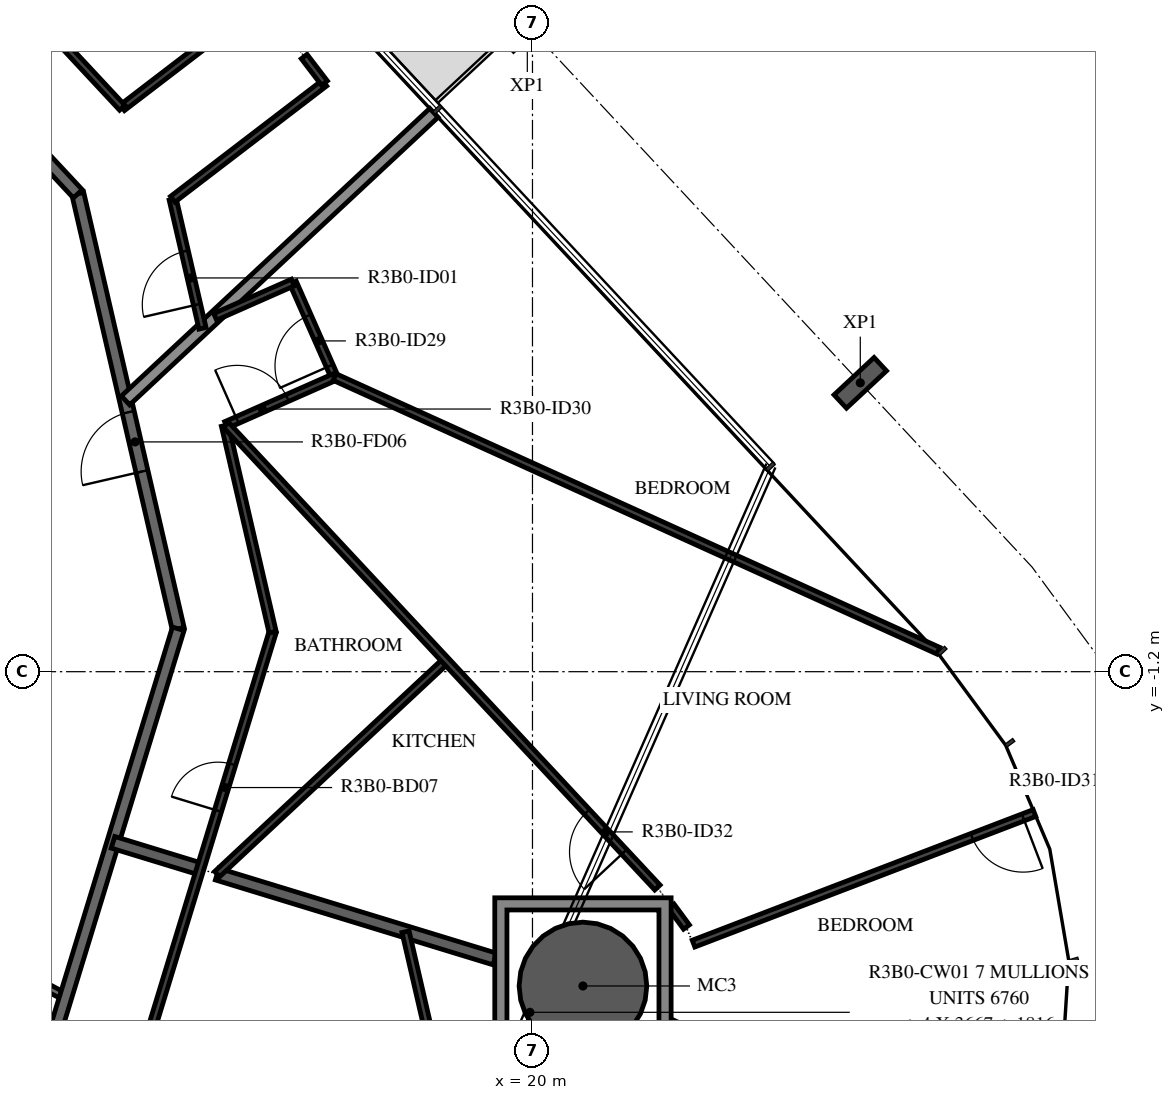
"""IFC4 building model, lengths in metres.
Left out: names, types, materials, properties, quantities, classifications, styles, units other than length and angle.
Written with IfcOpenShell. Run it as: python <this file> out.ifc"""

import sys

from ifc_helpers import new_model, si_unit, direction, frame, frame_2d, origin, origin_2d, place, context, subcontext, project, spatial, polyline, rectangle, hollow_circle, i_section, outline, extrude, element, fill, save


model = new_model("IFC4")
c1 = context("Model", 3, precision=1e-05, world=origin(), true_north=direction((0.0, 1.0)))
c2 = subcontext(c1, "Body", "Model", "MODEL_VIEW")
j1 = project(units=[si_unit("LENGTHUNIT", "METRE"), si_unit("PLANEANGLEUNIT", "RADIAN")], contexts=[c1])
p1 = place(None, origin())
s1 = spatial("IfcSite", under=j1, at=p1, CompositionType="ELEMENT")
p2 = place(p1, origin())
s2 = spatial("IfcBuilding", under=s1, at=p2, CompositionType="ELEMENT")
p3 = place(p2, frame((0.0, 0.0, 127.4)))
s3 = spatial("IfcBuildingStorey", under=s2, at=p3, CompositionType="ELEMENT", Elevation=127.4)
p4 = place(p3, frame((20.83, -6.368, -0.38), z_axis=(0.0, 0.0, 1.0), x_axis=(1.0, 0.0, 0.0)))
e1 = element("IfcColumn", 1, at=p4, inside=s3, PredefinedType="COLUMN", context=c2, shape_type="SweptSolid", body=[
    extrude(hollow_circle(Radius=1.05, WallThickness=0.05, at=origin_2d()), origin(), (0.0, 0.0, 1.0), 3.5),
])
p5 = place(p3, frame((25.391, 3.55, -0.38), z_axis=(0.0, 0.0, 1.0), x_axis=(0.68199801865, -0.731354019992, 0.0)))
e2 = element("IfcColumn", 2, at=p5, inside=s3, PredefinedType="COLUMN", context=c2, shape_type="SweptSolid", body=[
    extrude(i_section(OverallWidth=0.3, OverallDepth=0.9, WebThickness=0.019, FlangeThickness=0.035, FilletRadius=0.03, at=origin_2d()), origin(), (0.0, 0.0, 1.0), 3.5),
])
p6 = place(p3, frame((10.511, -5.589, 0.0), z_axis=(0.0, 0.0, 1.0), x_axis=(0.882987820808, -0.469395897196, 0.0)))
e3 = element("IfcWall", 3, at=p6, inside=s3, PredefinedType="PARTITIONING", context=c2, shape_type="SweptSolid", body=[
    extrude(rectangle(XDim=2.052, YDim=0.12, at=frame_2d((1.026, 0.0))), origin(), (0.0, 0.0, 1.0), 3.12),
])
p7 = place(p6, frame((0.1, 0.0, 0.0)))
e4 = element("IfcOpeningElement", 4, at=p7, cuts=e3, PredefinedType="OPENING", context=c2, shape_type="SweptSolid", body=[
    extrude(rectangle(XDim=1.2, YDim=2.1, at=frame_2d((0.6, 1.05))), frame((0.0, 0.07, 0.0), z_axis=(0.0, -1.0, 0.0), x_axis=(1.0, 0.0, 0.0)), (0.0, 0.0, 1.0), 0.14),
])
p8 = place(p3, frame((14.175, -0.495, 0.0), z_axis=(0.0, 0.0, 1.0), x_axis=(-0.224922649383, 0.974376622151, 0.0)))
e5 = element("IfcWall", 5, at=p8, inside=s3, PredefinedType="STANDARD", context=c2, shape_type="SweptSolid", body=[
    extrude(rectangle(XDim=7.342, YDim=0.2, at=frame_2d((3.671, 0.0))), origin(), (0.0, 0.0, 1.0), 3.12),
])
p9 = place(p8, frame((2.655, 0.0, 0.0)))
e6 = element("IfcOpeningElement", 6, at=p9, cuts=e5, PredefinedType="OPENING", context=c2, shape_type="SweptSolid", body=[
    extrude(rectangle(XDim=1.0, YDim=2.1, at=frame_2d((0.5, 1.05))), frame((0.0, 0.11, 0.0), z_axis=(0.0, -1.0, 0.0), x_axis=(1.0, 0.0, 0.0)), (0.0, 0.0, 1.0), 0.22),
])
p10 = place(p3, frame((12.523, 6.659, 0.0), z_axis=(0.0, 0.0, 1.0), x_axis=(-0.682001841105, 0.731350455479, 0.0)))
e7 = element("IfcWall", 7, at=p10, inside=s3, PredefinedType="STANDARD", context=c2, shape_type="SweptSolid", body=[
    extrude(rectangle(XDim=7.342, YDim=0.2, at=frame_2d((3.671, 0.0))), origin(), (0.0, 0.0, 1.0), 3.12),
])
p11 = place(p10, frame((3.2, 0.0, 0.0)))
e8 = element("IfcOpeningElement", 8, at=p11, cuts=e7, PredefinedType="OPENING", context=c2, shape_type="SweptSolid", body=[
    extrude(rectangle(XDim=1.0, YDim=2.1, at=frame_2d((0.5, 1.05))), frame((0.0, 0.11, 0.0), z_axis=(0.0, -1.0, 0.0), x_axis=(1.0, 0.0, 0.0)), (0.0, 0.0, 1.0), 0.22),
])
p12 = place(p3, frame((12.028, -7.516, 0.0), z_axis=(0.0, 0.0, 1.0), x_axis=(0.292365533182, 0.956306642771, 0.0)))
e9 = element("IfcWall", 9, at=p12, inside=s3, PredefinedType="STANDARD", context=c2, shape_type="SweptSolid", body=[
    extrude(rectangle(XDim=7.342, YDim=0.2, at=frame_2d((3.671, 0.0))), origin(), (0.0, 0.0, 1.0), 3.12),
])
p13 = place(p3, frame((13.308, 3.261, 0.0), z_axis=(0.0, 0.0, 1.0), x_axis=(0.731356087831, 0.681995801154, 0.0)))
e10 = element("IfcWall", 10, at=p13, inside=s3, PredefinedType="STANDARD", context=c2, shape_type="SweptSolid", body=[
    extrude(rectangle(XDim=6.934, YDim=0.2, at=frame_2d((3.467, 0.0))), origin(), (0.0, 0.0, 1.0), 2.73),
])
p14 = place(p3, frame((14.536, -4.444, 0.0), z_axis=(0.0, 0.0, 1.0), x_axis=(-0.956326299111, 0.292301230974, 0.0)))
e11 = element("IfcWall", 11, at=p14, inside=s3, PredefinedType="STANDARD", context=c2, shape_type="SweptSolid", body=[
    extrude(rectangle(XDim=1.5, YDim=0.2, at=frame_2d((0.75, 0.0))), origin(), (0.0, 0.0, 1.0), 3.12),
])
p15 = place(p3, frame((19.38, -5.925, 0.0), z_axis=(0.0, 0.0, 1.0), x_axis=(-0.956301542054, 0.29238221674, 0.0)))
e12 = element("IfcWall", 12, at=p15, inside=s3, PredefinedType="STANDARD", context=c2, shape_type="SweptSolid", body=[
    extrude(rectangle(XDim=4.775, YDim=0.2, at=frame_2d((2.387, 0.0))), origin(), (0.0, 0.0, 1.0), 3.12),
])
p16 = place(p3, frame((14.573, 4.447, 0.0), z_axis=(0.0, 0.0, 1.0), x_axis=(-0.225006886074, 0.97435717333, 0.0)))
e13 = element("IfcWall", 13, at=p16, inside=s3, PredefinedType="PARTITIONING", context=c2, shape_type="SweptSolid", body=[
    extrude(rectangle(XDim=2.178, YDim=0.12, at=frame_2d((1.089, 0.0))), origin(), (0.0, 0.0, 1.0), 3.12),
])
p17 = place(p16, frame((0.4, 0.0, 0.0)))
e14 = element("IfcOpeningElement", 14, at=p17, cuts=e13, PredefinedType="OPENING", context=c2, shape_type="SweptSolid", body=[
    extrude(rectangle(XDim=0.9, YDim=2.1, at=frame_2d((0.45, 1.05))), frame((0.0, 0.07, 0.0), z_axis=(0.0, -1.0, 0.0), x_axis=(1.0, 0.0, 0.0)), (0.0, 0.0, 1.0), 0.14),
])
p18 = place(p3, frame((14.083, 6.569, 0.0), z_axis=(0.0, 0.0, 1.0), x_axis=(0.794099847012, 0.607787325449, 0.0)))
e15 = element("IfcWall", 15, at=p18, inside=s3, PredefinedType="PARTITIONING", context=c2, shape_type="SweptSolid", body=[
    extrude(rectangle(XDim=3.144, YDim=0.12, at=frame_2d((1.572, 0.0))), origin(), (0.0, 0.0, 1.0), 3.12),
])
p19 = place(p3, frame((16.58, 8.479, 0.0), z_axis=(0.0, 0.0, 1.0), x_axis=(-0.607993560766, 0.793941956359, 0.0)))
e16 = element("IfcWall", 16, at=p19, inside=s3, PredefinedType="PARTITIONING", context=c2, shape_type="SweptSolid", body=[
    extrude(rectangle(XDim=0.55, YDim=0.12, at=frame_2d((0.275, 0.0))), origin(), (0.0, 0.0, 1.0), 3.12),
])
p20 = place(p3, frame((15.268, 9.617, 0.0), z_axis=(0.0, 0.0, 1.0), x_axis=(-0.79409554088, -0.607792951551, 0.0)))
e17 = element("IfcWall", 17, at=p20, inside=s3, PredefinedType="PARTITIONING", context=c2, shape_type="SweptSolid", body=[
    extrude(rectangle(XDim=2.537, YDim=0.12, at=frame_2d((1.269, 0.0))), origin(), (0.0, 0.0, 1.0), 3.12),
])
p21 = place(p3, frame((13.254, 8.075, 0.0), z_axis=(0.0, 0.0, 1.0), x_axis=(-0.681995901471, 0.731355994285, 0.0)))
e18 = element("IfcWall", 18, at=p21, inside=s3, PredefinedType="PARTITIONING", context=c2, shape_type="SweptSolid", body=[
    extrude(rectangle(XDim=7.207, YDim=0.12, at=frame_2d((3.603, 0.0))), origin(), (0.0, 0.0, 1.0), 3.12),
])
p22 = place(p21, frame((4.672, 0.0, 0.0)))
e19 = element("IfcOpeningElement", 19, at=p22, cuts=e18, PredefinedType="OPENING", context=c2, shape_type="SweptSolid", body=[
    extrude(rectangle(XDim=0.9, YDim=2.1, at=frame_2d((0.45, 1.05))), frame((0.0, 0.07, 0.0), z_axis=(0.0, -1.0, 0.0), x_axis=(1.0, 0.0, 0.0)), (0.0, 0.0, 1.0), 0.14),
])
p23 = place(p3, frame((13.7, -7.177, 0.0), z_axis=(0.0, 0.0, 1.0), x_axis=(0.292382309758, 0.956301513614, 0.0)))
e20 = element("IfcWall", 20, at=p23, inside=s3, PredefinedType="PARTITIONING", context=c2, shape_type="SweptSolid", body=[
    extrude(rectangle(XDim=6.93, YDim=0.12, at=frame_2d((3.465, 0.0))), origin(), (0.0, 0.0, 1.0), 3.12),
])
p24 = place(p23, frame((3.858, 0.0, 0.0)))
e21 = element("IfcOpeningElement", 21, at=p24, cuts=e20, PredefinedType="OPENING", context=c2, shape_type="SweptSolid", body=[
    extrude(rectangle(XDim=0.8, YDim=2.1, at=frame_2d((0.4, 1.05))), frame((0.0, 0.07, 0.0), z_axis=(0.0, -1.0, 0.0), x_axis=(1.0, 0.0, 0.0)), (0.0, 0.0, 1.0), 0.14),
])
p25 = place(p3, frame((19.245, -11.25, 0.0), z_axis=(0.0, 0.0, 1.0), x_axis=(-0.224958805164, 0.974368275335, 0.0)))
e22 = element("IfcWall", 22, at=p25, inside=s3, PredefinedType="PARTITIONING", context=c2, shape_type="SweptSolid", body=[
    extrude(rectangle(XDim=5.926, YDim=0.12, at=frame_2d((2.963, 0.0))), origin(), (0.0, 0.0, 1.0), 3.12),
])
p26 = place(p25, frame((0.2, 0.0, 0.0)))
e23 = element("IfcOpeningElement", 23, at=p26, cuts=e22, PredefinedType="OPENING", context=c2, shape_type="SweptSolid", body=[
    extrude(rectangle(XDim=0.9, YDim=2.1, at=frame_2d((0.45, 1.05))), frame((0.0, 0.07, 0.0), z_axis=(0.0, -1.0, 0.0), x_axis=(1.0, 0.0, 0.0)), (0.0, 0.0, 1.0), 0.14),
])
p27 = place(p3, frame((16.747, 3.645, 0.0), z_axis=(0.0, 0.0, 1.0), x_axis=(-0.40401852801, 0.914750801598, 0.0)))
e24 = element("IfcWall", 24, at=p27, inside=s3, PredefinedType="PARTITIONING", context=c2, shape_type="SweptSolid", body=[
    extrude(rectangle(XDim=1.7, YDim=0.12, at=frame_2d((0.85, 0.0))), origin(), (0.0, 0.0, 1.0), 3.12),
])
p28 = place(p27, frame((0.2, 0.0, 0.0)))
e25 = element("IfcOpeningElement", 25, at=p28, cuts=e24, PredefinedType="OPENING", context=c2, shape_type="SweptSolid", body=[
    extrude(rectangle(XDim=0.9, YDim=2.1, at=frame_2d((0.45, 1.05))), frame((0.0, 0.07, 0.0), z_axis=(0.0, -1.0, 0.0), x_axis=(1.0, 0.0, 0.0)), (0.0, 0.0, 1.0), 0.14),
])
p29 = place(p3, frame((16.06, 5.2, 0.0), z_axis=(0.0, 0.0, 1.0), x_axis=(-0.91479626238, -0.403915583179, 0.0)))
e26 = element("IfcWall", 26, at=p29, inside=s3, PredefinedType="PARTITIONING", context=c2, shape_type="SweptSolid", body=[
    extrude(rectangle(XDim=1.397, YDim=0.12, at=frame_2d((0.698, 0.0))), origin(), (0.0, 0.0, 1.0), 3.12),
])
p30 = place(p3, frame((15.727, -0.549, 0.0), z_axis=(0.0, 0.0, 1.0), x_axis=(-0.224900416367, 0.974381754097, 0.0)))
e27 = element("IfcWall", 27, at=p30, inside=s3, PredefinedType="PARTITIONING", context=c2, shape_type="SweptSolid", body=[
    extrude(rectangle(XDim=3.487, YDim=0.12, at=frame_2d((1.743, 0.0))), origin(), (0.0, 0.0, 1.0), 3.12),
])
p31 = place(p3, frame((14.962, 2.857, 0.0), z_axis=(0.0, 0.0, 1.0), x_axis=(0.914732858216, 0.404059151734, 0.0)))
e28 = element("IfcWall", 28, at=p31, inside=s3, PredefinedType="PARTITIONING", context=c2, shape_type="SweptSolid", body=[
    extrude(rectangle(XDim=1.951, YDim=0.12, at=frame_2d((0.976, 0.0))), origin(), (0.0, 0.0, 1.0), 3.12),
])
p32 = place(p31, frame((0.2, 0.0, 0.0)))
e29 = element("IfcOpeningElement", 29, at=p32, cuts=e28, PredefinedType="OPENING", context=c2, shape_type="SweptSolid", body=[
    extrude(rectangle(XDim=0.9, YDim=2.1, at=frame_2d((0.45, 1.05))), frame((0.0, 0.07, 0.0), z_axis=(0.0, -1.0, 0.0), x_axis=(1.0, 0.0, 0.0)), (0.0, 0.0, 1.0), 0.14),
])
p33 = place(p3, frame((16.747, 3.645, 0.0), z_axis=(0.0, 0.0, 1.0), x_axis=(0.910796273175, -0.412856087238, 0.0)))
e30 = element("IfcWall", 30, at=p33, inside=s3, PredefinedType="PARTITIONING", context=c2, shape_type="SweptSolid", body=[
    extrude(rectangle(XDim=10.901, YDim=0.12, at=frame_2d((5.45, 0.0))), origin(), (0.0, 0.0, 1.0), 3.12),
])
p34 = place(p3, frame((28.255, -3.525, 0.0), z_axis=(0.0, 0.0, 1.0), x_axis=(-0.933839412031, -0.357692539114, 0.0)))
e31 = element("IfcWall", 31, at=p34, inside=s3, PredefinedType="PARTITIONING", context=c2, shape_type="SweptSolid", body=[
    extrude(rectangle(XDim=6.004, YDim=0.12, at=frame_2d((3.002, 0.0))), origin(), (0.0, 0.0, 1.0), 2.73),
])
p35 = place(p34, frame((0.2, 0.0, 0.0)))
e32 = element("IfcOpeningElement", 32, at=p35, cuts=e31, PredefinedType="OPENING", context=c2, shape_type="SweptSolid", body=[
    extrude(rectangle(XDim=0.9, YDim=2.1, at=frame_2d((0.45, 1.05))), frame((0.0, 0.07, 0.0), z_axis=(0.0, -1.0, 0.0), x_axis=(1.0, 0.0, 0.0)), (0.0, 0.0, 1.0), 0.14),
])
p36 = place(p3, frame((22.532, -5.399, 0.0), z_axis=(0.0, 0.0, 1.0), x_axis=(-0.592456078431, 0.805602752683, 0.0)))
e33 = element("IfcWall", 33, at=p36, inside=s3, PredefinedType="PARTITIONING", context=c2, shape_type="SweptSolid", body=[
    extrude(rectangle(XDim=0.426, YDim=0.12, at=frame_2d((0.213, 0.0))), origin(), (0.0, 0.0, 1.0), 3.12),
])
p37 = place(p3, frame((18.577, -1.02, 0.0), z_axis=(0.0, 0.0, 1.0), x_axis=(-0.731348673524, -0.682003751994, 0.0)))
e34 = element("IfcWall", 34, at=p37, inside=s3, PredefinedType="PARTITIONING", context=c2, shape_type="SweptSolid", body=[
    extrude(rectangle(XDim=5.146, YDim=0.12, at=frame_2d((2.573, 0.0))), origin(), (0.0, 0.0, 1.0), 3.12),
])
p38 = place(p3, frame((22.054, -4.749, 0.0), z_axis=(0.0, 0.0, 1.0), x_axis=(-0.682014558945, 0.731338595582, 0.0)))
e35 = element("IfcWall", 35, at=p38, inside=s3, PredefinedType="PARTITIONING", context=c2, shape_type="SweptSolid", body=[
    extrude(rectangle(XDim=10.399, YDim=0.12, at=frame_2d((5.2, 0.0))), origin(), (0.0, 0.0, 1.0), 3.12),
])
p39 = place(p38, frame((0.8, 0.0, 0.0)))
e36 = element("IfcOpeningElement", 36, at=p39, cuts=e35, PredefinedType="OPENING", context=c2, shape_type="SweptSolid", body=[
    extrude(rectangle(XDim=0.9, YDim=2.1, at=frame_2d((0.45, 1.05))), frame((0.0, 0.07, 0.0), z_axis=(0.0, -1.0, 0.0), x_axis=(1.0, 0.0, 0.0)), (0.0, 0.0, 1.0), 0.14),
])
p40 = place(p3, origin())
e37 = element("IfcWall", 37, at=p40, inside=s3, PredefinedType="STANDARD", context=c2, shape_type="SweptSolid", body=[
    extrude(outline(polyline([(22.28, -4.918), (22.28, -7.818), (19.38, -7.818), (19.38, -4.918), (22.28, -4.918)]), holes=[polyline([(19.58, -7.618), (22.08, -7.618), (22.08, -5.118), (19.58, -5.118), (19.58, -7.618)])]), origin(), (0.0, 0.0, 1.0), 3.12),
])
p41 = place(p17, origin())
e38 = element("IfcDoor", 38, at=p41, inside=s3, OperationType="SINGLE_SWING_LEFT", PredefinedType="DOOR", context=c2, shape_type="SweptSolid", body=[
    extrude(rectangle(XDim=0.9, YDim=2.1, at=frame_2d((0.45, 1.05))), frame((0.0, 0.025, 0.0), z_axis=(0.0, -1.0, 0.0), x_axis=(1.0, 0.0, 0.0)), (0.0, 0.0, 1.0), 0.05),
])
fill(e14, e38)
p42 = place(p9, origin())
e39 = element("IfcDoor", 39, at=p42, inside=s3, OperationType="SINGLE_SWING_LEFT", PredefinedType="DOOR", context=c2, shape_type="SweptSolid", body=[
    extrude(rectangle(XDim=1.0, YDim=2.1, at=frame_2d((0.5, 1.05))), frame((0.0, 0.025, 0.0), z_axis=(0.0, -1.0, 0.0), x_axis=(1.0, 0.0, 0.0)), (0.0, 0.0, 1.0), 0.05),
])
fill(e6, e39)
p43 = place(p28, origin())
e40 = element("IfcDoor", 40, at=p43, inside=s3, OperationType="SINGLE_SWING_LEFT", PredefinedType="DOOR", context=c2, shape_type="SweptSolid", body=[
    extrude(rectangle(XDim=0.9, YDim=2.1, at=frame_2d((0.45, 1.05))), frame((0.0, 0.025, 0.0), z_axis=(0.0, -1.0, 0.0), x_axis=(1.0, 0.0, 0.0)), (0.0, 0.0, 1.0), 0.05),
])
fill(e25, e40)
p44 = place(p24, origin())
e41 = element("IfcDoor", 41, at=p44, inside=s3, OperationType="SINGLE_SWING_LEFT", PredefinedType="DOOR", context=c2, shape_type="SweptSolid", body=[
    extrude(rectangle(XDim=0.8, YDim=2.1, at=frame_2d((0.4, 1.05))), frame((0.0, 0.025, 0.0), z_axis=(0.0, -1.0, 0.0), x_axis=(1.0, 0.0, 0.0)), (0.0, 0.0, 1.0), 0.05),
])
fill(e21, e41)
p45 = place(p32, origin())
e42 = element("IfcDoor", 42, at=p45, inside=s3, OperationType="SINGLE_SWING_RIGHT", PredefinedType="DOOR", context=c2, shape_type="SweptSolid", body=[
    extrude(rectangle(XDim=0.9, YDim=2.1, at=frame_2d((0.45, 1.05))), frame((0.0, 0.025, 0.0), z_axis=(0.0, -1.0, 0.0), x_axis=(1.0, 0.0, 0.0)), (0.0, 0.0, 1.0), 0.05),
])
fill(e29, e42)
p46 = place(p35, origin())
e43 = element("IfcDoor", 43, at=p46, inside=s3, OperationType="SINGLE_SWING_LEFT", PredefinedType="DOOR", context=c2, shape_type="SweptSolid", body=[
    extrude(rectangle(XDim=0.9, YDim=2.1, at=frame_2d((0.45, 1.05))), frame((0.0, 0.025, 0.0), z_axis=(0.0, -1.0, 0.0), x_axis=(1.0, 0.0, 0.0)), (0.0, 0.0, 1.0), 0.05),
])
fill(e32, e43)
p47 = place(p39, origin())
e44 = element("IfcDoor", 44, at=p47, inside=s3, OperationType="SINGLE_SWING_RIGHT", PredefinedType="DOOR", context=c2, shape_type="SweptSolid", body=[
    extrude(rectangle(XDim=0.9, YDim=2.1, at=frame_2d((0.45, 1.05))), frame((0.0, 0.025, 0.0), z_axis=(0.0, -1.0, 0.0), x_axis=(1.0, 0.0, 0.0)), (0.0, 0.0, 1.0), 0.05),
])
fill(e36, e44)
save(model, sys.argv[1])
